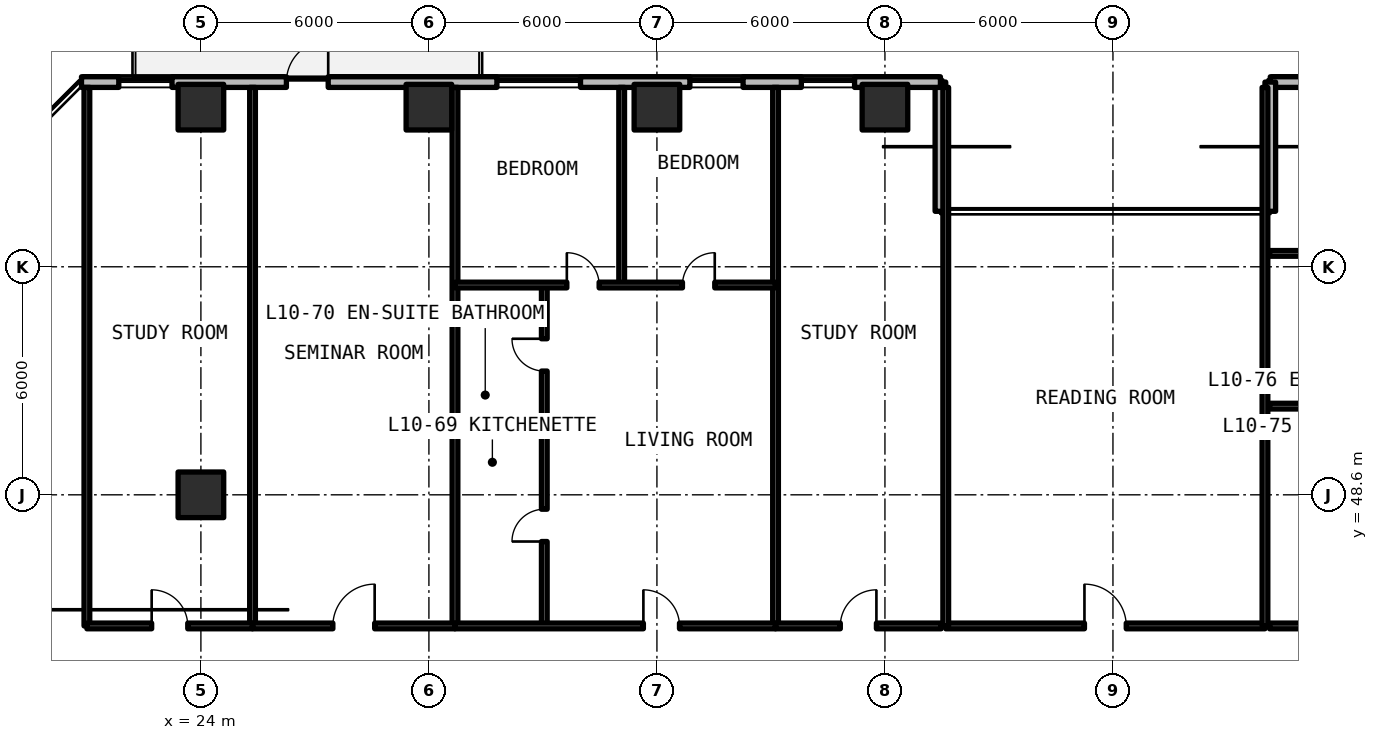
"""IFC4 building model, lengths in metres.
Left out: names, types, materials, properties, quantities, classifications, styles, units other than length and angle.
Written with IfcOpenShell. Run it as: python <this file> out.ifc"""

import sys

from ifc_helpers import new_model, si_unit, direction, frame, frame_2d, origin, origin_2d, place, context, subcontext, project, spatial, rectangle, extrude, element, fill, save


model = new_model("IFC4")
c1 = context("Model", 3, precision=1e-05, world=origin(), true_north=direction((0.0, 1.0)))
c2 = subcontext(c1, "Body", "Model", "MODEL_VIEW")
j1 = project(units=[si_unit("LENGTHUNIT", "METRE"), si_unit("PLANEANGLEUNIT", "RADIAN")], contexts=[c1])
p1 = place(None, origin())
s1 = spatial("IfcSite", under=j1, at=p1, CompositionType="ELEMENT")
p2 = place(p1, origin())
s2 = spatial("IfcBuilding", under=s1, at=p2, CompositionType="ELEMENT")
p3 = place(p2, frame((0.0, 0.0, 38.94)))
s3 = spatial("IfcBuildingStorey", under=s2, at=p3, CompositionType="ELEMENT", Elevation=38.94)
for number, where, z_axis, x_axis in (
    (1, (24.0, 48.6, 0.0), (0.0, 0.0, 1.0), (1.0, 0.0, 0.0)),
    (2, (24.0, 58.8, 0.0), (0.0, 0.0, 1.0), (1.0, 0.0, 0.0)),
    (3, (30.0, 58.8, 0.0), (0.0, 0.0, 1.0), (1.0, 0.0, 0.0)),
    (4, (36.0, 58.8, 0.0), (0.0, 0.0, 1.0), (1.0, 0.0, 0.0)),
    (5, (42.0, 58.8, 0.0), (0.0, 0.0, 1.0), (1.0, 0.0, 0.0)),
):
    element("IfcColumn", number, at=place(p3, frame(where, z_axis=z_axis, x_axis=x_axis)), inside=s3, PredefinedType="COLUMN", context=c2, shape_type="SweptSolid", body=[
        extrude(rectangle(XDim=1.2, YDim=1.2, at=origin_2d()), origin(), (0.0, 0.0, 1.0), 3.3),
    ])
p4 = place(p3, frame((96.542, 59.46, 0.0), z_axis=(0.0, 0.0, 1.0), x_axis=(-1.0, 0.0, 0.0)))
e6 = element("IfcWall", 6, at=p4, inside=s3, PredefinedType="SOLIDWALL", context=c2, shape_type="SweptSolid", body=[
    extrude(rectangle(XDim=44.402, YDim=0.28, at=frame_2d((22.201, 0.0))), origin(), (0.0, 0.0, 1.0), 3.08),
])
p5 = place(p4, frame((33.642, 0.0, 0.0)))
e7 = element("IfcOpeningElement", 7, at=p5, cuts=e6, PredefinedType="OPENING", context=c2, shape_type="SweptSolid", body=[
    extrude(rectangle(XDim=1.1, YDim=2.15, at=frame_2d((0.55, 1.075))), frame((0.0, 0.15, 0.0), z_axis=(0.0, -1.0, 0.0), x_axis=(1.0, 0.0, 0.0)), (0.0, 0.0, 1.0), 0.3),
])
p6 = place(p4, frame((21.292, 0.0, 0.0)))
e8 = element("IfcOpeningElement", 8, at=p6, cuts=e6, PredefinedType="OPENING", context=c2, shape_type="SweptSolid", body=[
    extrude(rectangle(XDim=1.1, YDim=2.15, at=frame_2d((0.55, 1.075))), frame((0.0, 0.15, 0.0), z_axis=(0.0, -1.0, 0.0), x_axis=(1.0, 0.0, 0.0)), (0.0, 0.0, 1.0), 0.3),
])
p7 = place(p4, frame((9.692, 0.0, 0.0)))
e9 = element("IfcOpeningElement", 9, at=p7, cuts=e6, PredefinedType="OPENING", context=c2, shape_type="SweptSolid", body=[
    extrude(rectangle(XDim=1.1, YDim=2.15, at=frame_2d((0.55, 1.075))), frame((0.0, 0.15, 0.0), z_axis=(0.0, -1.0, 0.0), x_axis=(1.0, 0.0, 0.0)), (0.0, 0.0, 1.0), 0.3),
])
p8 = place(p4, frame((39.455, 0.0, 0.78)))
e10 = element("IfcOpeningElement", 10, at=p8, cuts=e6, PredefinedType="OPENING", context=c2, shape_type="SweptSolid", body=[
    extrude(rectangle(XDim=2.2, YDim=1.66, at=frame_2d((1.1, 0.83))), frame((0.0, 0.15, 0.0), z_axis=(0.0, -1.0, 0.0), x_axis=(1.0, 0.0, 0.0)), (0.0, 0.0, 1.0), 0.3),
])
p9 = place(p4, frame((26.053, 0.0, 0.78)))
e11 = element("IfcOpeningElement", 11, at=p9, cuts=e6, PredefinedType="OPENING", context=c2, shape_type="SweptSolid", body=[
    extrude(rectangle(XDim=2.2, YDim=1.66, at=frame_2d((1.1, 0.83))), frame((0.0, 0.15, 0.0), z_axis=(0.0, -1.0, 0.0), x_axis=(1.0, 0.0, 0.0)), (0.0, 0.0, 1.0), 0.3),
])
p10 = place(p4, frame((2.098, 0.0, 0.78)))
e12 = element("IfcOpeningElement", 12, at=p10, cuts=e6, PredefinedType="OPENING", context=c2, shape_type="SweptSolid", body=[
    extrude(rectangle(XDim=2.2, YDim=1.66, at=frame_2d((1.1, 0.83))), frame((0.0, 0.15, 0.0), z_axis=(0.0, -1.0, 0.0), x_axis=(1.0, 0.0, 0.0)), (0.0, 0.0, 1.0), 0.3),
])
for number, where, z_axis, x_axis in (
    (13, (52.14, 59.46, 0.0), (0.0, 0.0, 1.0), (0.0, -1.0, 0.0)),
    (14, (43.46, 56.06, 0.0), (0.0, 0.0, 1.0), (0.0, 1.0, 0.0)),
):
    element("IfcWall", number, at=place(p3, frame(where, z_axis=z_axis, x_axis=x_axis)), inside=s3, PredefinedType="SOLIDWALL", context=c2, shape_type="SweptSolid", body=[
        extrude(rectangle(XDim=3.4, YDim=0.28, at=frame_2d((1.7, 0.0))), origin(), (0.0, 0.0, 1.0), 3.08),
    ])
p11 = place(p3, frame((43.46, 59.46, 0.0), z_axis=(0.0, 0.0, 1.0), x_axis=(-1.0, 0.0, 0.0)))
e15 = element("IfcWall", 15, at=p11, inside=s3, PredefinedType="SOLIDWALL", context=c2, shape_type="SweptSolid", body=[
    extrude(rectangle(XDim=22.602, YDim=0.28, at=frame_2d((11.301, 0.0))), origin(), (0.0, 0.0, 1.0), 3.08),
])
p12 = place(p11, frame((16.11, 0.0, 0.0)))
e16 = element("IfcOpeningElement", 16, at=p12, cuts=e15, PredefinedType="OPENING", context=c2, shape_type="SweptSolid", body=[
    extrude(rectangle(XDim=1.1, YDim=2.15, at=frame_2d((0.55, 1.075))), frame((0.0, 0.15, 0.0), z_axis=(0.0, -1.0, 0.0), x_axis=(1.0, 0.0, 0.0)), (0.0, 0.0, 1.0), 0.3),
])
p13 = place(p11, frame((20.221, 0.0, 0.78)))
e17 = element("IfcOpeningElement", 17, at=p13, cuts=e15, PredefinedType="OPENING", context=c2, shape_type="SweptSolid", body=[
    extrude(rectangle(XDim=1.4, YDim=1.65, at=frame_2d((0.7, 0.825))), frame((0.0, 0.15, 0.0), z_axis=(0.0, -1.0, 0.0), x_axis=(1.0, 0.0, 0.0)), (0.0, 0.0, 1.0), 0.3),
])
p14 = place(p11, frame((9.471, 0.0, 0.78)))
e18 = element("IfcOpeningElement", 18, at=p14, cuts=e15, PredefinedType="OPENING", context=c2, shape_type="SweptSolid", body=[
    extrude(rectangle(XDim=2.2, YDim=1.66, at=frame_2d((1.1, 0.83))), frame((0.0, 0.15, 0.0), z_axis=(0.0, -1.0, 0.0), x_axis=(1.0, 0.0, 0.0)), (0.0, 0.0, 1.0), 0.3),
])
p15 = place(p11, frame((5.193, 0.0, 0.78)))
e19 = element("IfcOpeningElement", 19, at=p15, cuts=e15, PredefinedType="OPENING", context=c2, shape_type="SweptSolid", body=[
    extrude(rectangle(XDim=1.4, YDim=1.65, at=frame_2d((0.7, 0.825))), frame((0.0, 0.15, 0.0), z_axis=(0.0, -1.0, 0.0), x_axis=(1.0, 0.0, 0.0)), (0.0, 0.0, 1.0), 0.3),
])
p16 = place(p11, frame((2.26, 0.0, 0.78)))
e20 = element("IfcOpeningElement", 20, at=p16, cuts=e15, PredefinedType="OPENING", context=c2, shape_type="SweptSolid", body=[
    extrude(rectangle(XDim=1.4, YDim=1.65, at=frame_2d((0.7, 0.825))), frame((0.0, 0.15, 0.0), z_axis=(0.0, -1.0, 0.0), x_axis=(1.0, 0.0, 0.0)), (0.0, 0.0, 1.0), 0.3),
])
p17 = place(p3, frame((43.6, 45.15, 0.0), z_axis=(0.0, 0.0, 1.0), x_axis=(1.0, 0.0, 0.0)))
e21 = element("IfcWall", 21, at=p17, inside=s3, PredefinedType="SOLIDWALL", context=c2, shape_type="SweptSolid", body=[
    extrude(rectangle(XDim=8.4, YDim=0.15, at=frame_2d((4.2, 0.0))), origin(), (0.0, 0.0, 1.0), 2.35),
])
p18 = place(p17, frame((3.65, 0.0, 0.0)))
e22 = element("IfcOpeningElement", 22, at=p18, cuts=e21, PredefinedType="OPENING", context=c2, shape_type="SweptSolid", body=[
    extrude(rectangle(XDim=1.1, YDim=2.15, at=frame_2d((0.55, 1.075))), frame((0.0, 0.085, 0.0), z_axis=(0.0, -1.0, 0.0), x_axis=(1.0, 0.0, 0.0)), (0.0, 0.0, 1.0), 0.17),
])
for number, where, z_axis, x_axis in (
    (23, (43.6, 45.15, 0.0), (0.0, 0.0, 1.0), (0.0, 1.0, 0.0)),
    (24, (52.0, 45.15, 0.0), (0.0, 0.0, 1.0), (0.0, 1.0, 0.0)),
    (25, (21.0, 45.15, 0.0), (0.0, 0.0, 1.0), (0.0, 1.0, 0.0)),
    (26, (25.359, 45.15, 0.0), (0.0, 0.0, 1.0), (0.0, 1.0, 0.0)),
):
    element("IfcWall", number, at=place(p3, frame(where, z_axis=z_axis, x_axis=x_axis)), inside=s3, PredefinedType="SOLIDWALL", context=c2, shape_type="SweptSolid", body=[
        extrude(rectangle(XDim=14.17, YDim=0.15, at=frame_2d((7.085, 0.0))), origin(), (0.0, 0.0, 1.0), 2.35),
    ])
p19 = place(p3, frame((21.0, 45.15, 0.0), z_axis=(0.0, 0.0, 1.0), x_axis=(1.0, 0.0, 0.0)))
e27 = element("IfcWall", 27, at=p19, inside=s3, PredefinedType="SOLIDWALL", context=c2, shape_type="SweptSolid", body=[
    extrude(rectangle(XDim=4.359, YDim=0.15, at=frame_2d((2.179, 0.0))), origin(), (0.0, 0.0, 1.0), 2.35),
])
p20 = place(p19, frame((1.704, 0.0, 0.0)))
e28 = element("IfcOpeningElement", 28, at=p20, cuts=e27, PredefinedType="OPENING", context=c2, shape_type="SweptSolid", body=[
    extrude(rectangle(XDim=0.95, YDim=2.15, at=frame_2d((0.475, 1.075))), frame((0.0, 0.085, 0.0), z_axis=(0.0, -1.0, 0.0), x_axis=(1.0, 0.0, 0.0)), (0.0, 0.0, 1.0), 0.17),
])
p21 = place(p3, frame((30.686, 45.15, 0.0), z_axis=(0.0, 0.0, 1.0), x_axis=(0.0, 1.0, 0.0)))
e29 = element("IfcWall", 29, at=p21, inside=s3, PredefinedType="SOLIDWALL", context=c2, shape_type="SweptSolid", body=[
    extrude(rectangle(XDim=14.17, YDim=0.15, at=frame_2d((7.085, 0.0))), origin(), (0.0, 0.0, 1.0), 2.35),
])
p22 = place(p3, frame((25.359, 45.15, 0.0), z_axis=(0.0, 0.0, 1.0), x_axis=(1.0, 0.0, 0.0)))
e30 = element("IfcWall", 30, at=p22, inside=s3, PredefinedType="SOLIDWALL", context=c2, shape_type="SweptSolid", body=[
    extrude(rectangle(XDim=5.327, YDim=0.15, at=frame_2d((2.664, 0.0))), origin(), (0.0, 0.0, 1.0), 2.35),
])
p23 = place(p22, frame((2.114, 0.0, 0.0)))
e31 = element("IfcOpeningElement", 31, at=p23, cuts=e30, PredefinedType="OPENING", context=c2, shape_type="SweptSolid", body=[
    extrude(rectangle(XDim=1.1, YDim=2.15, at=frame_2d((0.55, 1.075))), frame((0.0, 0.085, 0.0), z_axis=(0.0, -1.0, 0.0), x_axis=(1.0, 0.0, 0.0)), (0.0, 0.0, 1.0), 0.17),
])
p24 = place(p3, frame((39.121, 45.15, 0.0), z_axis=(0.0, 0.0, 1.0), x_axis=(0.0, 1.0, 0.0)))
e32 = element("IfcWall", 32, at=p24, inside=s3, PredefinedType="SOLIDWALL", context=c2, shape_type="SweptSolid", body=[
    extrude(rectangle(XDim=14.17, YDim=0.15, at=frame_2d((7.085, 0.0))), origin(), (0.0, 0.0, 1.0), 2.35),
])
p25 = place(p3, frame((30.686, 50.442, 0.0), z_axis=(0.0, 0.0, 1.0), x_axis=(1.0, 0.0, 0.0)))
e33 = element("IfcWall", 33, at=p25, inside=s3, PredefinedType="PARTITIONING", context=c2, shape_type="SweptSolid", body=[
    extrude(rectangle(XDim=2.35, YDim=0.15, at=frame_2d((1.175, 0.0))), origin(), (0.0, 0.0, 1.0), 2.35),
])
p26 = place(p3, frame((33.036, 45.15, 0.0), z_axis=(0.0, 0.0, 1.0), x_axis=(0.0, 1.0, 0.0)))
e34 = element("IfcWall", 34, at=p26, inside=s3, PredefinedType="PARTITIONING", context=c2, shape_type="SweptSolid", body=[
    extrude(rectangle(XDim=8.97, YDim=0.15, at=frame_2d((4.485, 0.0))), origin(), (0.0, 0.0, 1.0), 2.35),
])
p27 = place(p26, frame((2.221, 0.0, 0.0)))
e35 = element("IfcOpeningElement", 35, at=p27, cuts=e34, PredefinedType="OPENING", context=c2, shape_type="SweptSolid", body=[
    extrude(rectangle(XDim=0.85, YDim=2.1, at=frame_2d((0.425, 1.05))), frame((0.0, 0.085, 0.0), z_axis=(0.0, -1.0, 0.0), x_axis=(1.0, 0.0, 0.0)), (0.0, 0.0, 1.0), 0.17),
])
p28 = place(p26, frame((6.706, 0.0, 0.0)))
e36 = element("IfcOpeningElement", 36, at=p28, cuts=e34, PredefinedType="OPENING", context=c2, shape_type="SweptSolid", body=[
    extrude(rectangle(XDim=0.85, YDim=2.1, at=frame_2d((0.425, 1.05))), frame((0.0, 0.085, 0.0), z_axis=(0.0, -1.0, 0.0), x_axis=(1.0, 0.0, 0.0)), (0.0, 0.0, 1.0), 0.17),
])
p29 = place(p3, frame((35.073, 54.12, 0.0), z_axis=(0.0, 0.0, 1.0), x_axis=(0.0, 1.0, 0.0)))
e37 = element("IfcWall", 37, at=p29, inside=s3, PredefinedType="PARTITIONING", context=c2, shape_type="SweptSolid", body=[
    extrude(rectangle(XDim=5.2, YDim=0.15, at=frame_2d((2.6, 0.0))), origin(), (0.0, 0.0, 1.0), 2.35),
])
p30 = place(p3, frame((30.686, 54.12, 0.0), z_axis=(0.0, 0.0, 1.0), x_axis=(1.0, 0.0, 0.0)))
e38 = element("IfcWall", 38, at=p30, inside=s3, PredefinedType="PARTITIONING", context=c2, shape_type="SweptSolid", body=[
    extrude(rectangle(XDim=8.435, YDim=0.15, at=frame_2d((4.217, 0.0))), origin(), (0.0, 0.0, 1.0), 2.35),
])
p31 = place(p30, frame((2.943, 0.0, 0.0)))
e39 = element("IfcOpeningElement", 39, at=p31, cuts=e38, PredefinedType="OPENING", context=c2, shape_type="SweptSolid", body=[
    extrude(rectangle(XDim=0.85, YDim=2.1, at=frame_2d((0.425, 1.05))), frame((0.0, 0.085, 0.0), z_axis=(0.0, -1.0, 0.0), x_axis=(1.0, 0.0, 0.0)), (0.0, 0.0, 1.0), 0.17),
])
p32 = place(p30, frame((5.986, 0.0, 0.0)))
e40 = element("IfcOpeningElement", 40, at=p32, cuts=e38, PredefinedType="OPENING", context=c2, shape_type="SweptSolid", body=[
    extrude(rectangle(XDim=0.85, YDim=2.1, at=frame_2d((0.425, 1.05))), frame((0.0, 0.085, 0.0), z_axis=(0.0, -1.0, 0.0), x_axis=(1.0, 0.0, 0.0)), (0.0, 0.0, 1.0), 0.17),
])
p33 = place(p3, frame((30.686, 45.15, 0.0), z_axis=(0.0, 0.0, 1.0), x_axis=(1.0, 0.0, 0.0)))
e41 = element("IfcWall", 41, at=p33, inside=s3, PredefinedType="SOLIDWALL", context=c2, shape_type="SweptSolid", body=[
    extrude(rectangle(XDim=8.435, YDim=0.15, at=frame_2d((4.217, 0.0))), origin(), (0.0, 0.0, 1.0), 2.35),
])
p34 = place(p33, frame((4.958, 0.0, 0.0)))
e42 = element("IfcOpeningElement", 42, at=p34, cuts=e41, PredefinedType="OPENING", context=c2, shape_type="SweptSolid", body=[
    extrude(rectangle(XDim=0.95, YDim=2.15, at=frame_2d((0.475, 1.075))), frame((0.0, 0.085, 0.0), z_axis=(0.0, -1.0, 0.0), x_axis=(1.0, 0.0, 0.0)), (0.0, 0.0, 1.0), 0.17),
])
p35 = place(p3, frame((39.121, 45.15, 0.0), z_axis=(0.0, 0.0, 1.0), x_axis=(1.0, 0.0, 0.0)))
e43 = element("IfcWall", 43, at=p35, inside=s3, PredefinedType="SOLIDWALL", context=c2, shape_type="SweptSolid", body=[
    extrude(rectangle(XDim=4.359, YDim=0.15, at=frame_2d((2.179, 0.0))), origin(), (0.0, 0.0, 1.0), 2.35),
])
p36 = place(p35, frame((1.704, 0.0, 0.0)))
e44 = element("IfcOpeningElement", 44, at=p36, cuts=e43, PredefinedType="OPENING", context=c2, shape_type="SweptSolid", body=[
    extrude(rectangle(XDim=0.95, YDim=2.15, at=frame_2d((0.475, 1.075))), frame((0.0, 0.085, 0.0), z_axis=(0.0, -1.0, 0.0), x_axis=(1.0, 0.0, 0.0)), (0.0, 0.0, 1.0), 0.17),
])
p37 = place(p3, frame((52.12, 50.933, 0.0), z_axis=(0.0, 0.0, 1.0), x_axis=(1.0, 0.0, 0.0)))
e45 = element("IfcWall", 45, at=p37, inside=s3, PredefinedType="PARTITIONING", context=c2, shape_type="SweptSolid", body=[
    extrude(rectangle(XDim=3.8, YDim=0.15, at=frame_2d((1.9, 0.0))), origin(), (0.0, 0.0, 1.0), 2.35),
])
p38 = place(p3, frame((52.12, 54.952, 0.0), z_axis=(0.0, 0.0, 1.0), x_axis=(1.0, 0.0, 0.0)))
e46 = element("IfcWall", 46, at=p38, inside=s3, PredefinedType="PARTITIONING", context=c2, shape_type="SweptSolid", body=[
    extrude(rectangle(XDim=12.989, YDim=0.15, at=frame_2d((6.494, 0.0))), origin(), (0.0, 0.0, 1.0), 2.35),
])
p39 = place(p38, frame((4.852, 0.0, 0.0)))
e47 = element("IfcOpeningElement", 47, at=p39, cuts=e46, PredefinedType="OPENING", context=c2, shape_type="SweptSolid", body=[
    extrude(rectangle(XDim=0.85, YDim=2.1, at=frame_2d((0.425, 1.05))), frame((0.0, 0.085, 0.0), z_axis=(0.0, -1.0, 0.0), x_axis=(1.0, 0.0, 0.0)), (0.0, 0.0, 1.0), 0.17),
])
p40 = place(p38, frame((9.447, 0.0, 0.0)))
e48 = element("IfcOpeningElement", 48, at=p40, cuts=e46, PredefinedType="OPENING", context=c2, shape_type="SweptSolid", body=[
    extrude(rectangle(XDim=0.85, YDim=2.1, at=frame_2d((0.425, 1.05))), frame((0.0, 0.085, 0.0), z_axis=(0.0, -1.0, 0.0), x_axis=(1.0, 0.0, 0.0)), (0.0, 0.0, 1.0), 0.17),
])
p41 = place(p3, frame((52.12, 45.15, 0.0), z_axis=(0.0, 0.0, 1.0), x_axis=(1.0, 0.0, 0.0)))
e49 = element("IfcWall", 49, at=p41, inside=s3, PredefinedType="SOLIDWALL", context=c2, shape_type="SweptSolid", body=[
    extrude(rectangle(XDim=12.989, YDim=0.15, at=frame_2d((6.494, 0.0))), origin(), (0.0, 0.0, 1.0), 2.35),
])
p42 = place(p41, frame((5.387, 0.0, 0.0)))
e50 = element("IfcOpeningElement", 50, at=p42, cuts=e49, PredefinedType="OPENING", context=c2, shape_type="SweptSolid", body=[
    extrude(rectangle(XDim=0.95, YDim=2.15, at=frame_2d((0.475, 1.075))), frame((0.0, 0.085, 0.0), z_axis=(0.0, -1.0, 0.0), x_axis=(1.0, 0.0, 0.0)), (0.0, 0.0, 1.0), 0.17),
])
p43 = place(p12, frame((1.1, 0.0, 0.0), z_axis=(0.0, 0.0, 1.0), x_axis=(-1.0, 0.0, 0.0)))
e51 = element("IfcDoor", 51, at=p43, inside=s3, OperationType="SINGLE_SWING_RIGHT", PredefinedType="DOOR", context=c2, shape_type="SweptSolid", body=[
    extrude(rectangle(XDim=1.1, YDim=2.15, at=frame_2d((0.55, 1.075))), frame((0.0, 0.025, 0.0), z_axis=(0.0, -1.0, 0.0), x_axis=(1.0, 0.0, 0.0)), (0.0, 0.0, 1.0), 0.05),
])
fill(e16, e51)
p44 = place(p13, origin())
e52 = element("IfcWindow", 52, at=p44, inside=s3, PartitioningType="SINGLE_PANEL", PredefinedType="WINDOW", context=c2, shape_type="SweptSolid", body=[
    extrude(rectangle(XDim=1.4, YDim=1.65, at=frame_2d((0.7, 0.825))), frame((0.0, 0.03, 0.0), z_axis=(0.0, -1.0, 0.0), x_axis=(1.0, 0.0, 0.0)), (0.0, 0.0, 1.0), 0.06),
])
fill(e17, e52)
p45 = place(p14, origin())
e53 = element("IfcWindow", 53, at=p45, inside=s3, PartitioningType="SINGLE_PANEL", PredefinedType="WINDOW", context=c2, shape_type="SweptSolid", body=[
    extrude(rectangle(XDim=2.2, YDim=1.66, at=frame_2d((1.1, 0.83))), frame((0.0, 0.03, 0.0), z_axis=(0.0, -1.0, 0.0), x_axis=(1.0, 0.0, 0.0)), (0.0, 0.0, 1.0), 0.06),
])
fill(e18, e53)
p46 = place(p15, origin())
e54 = element("IfcWindow", 54, at=p46, inside=s3, PartitioningType="SINGLE_PANEL", PredefinedType="WINDOW", context=c2, shape_type="SweptSolid", body=[
    extrude(rectangle(XDim=1.4, YDim=1.65, at=frame_2d((0.7, 0.825))), frame((0.0, 0.03, 0.0), z_axis=(0.0, -1.0, 0.0), x_axis=(1.0, 0.0, 0.0)), (0.0, 0.0, 1.0), 0.06),
])
fill(e19, e54)
p47 = place(p16, origin())
e55 = element("IfcWindow", 55, at=p47, inside=s3, PartitioningType="SINGLE_PANEL", PredefinedType="WINDOW", context=c2, shape_type="SweptSolid", body=[
    extrude(rectangle(XDim=1.4, YDim=1.65, at=frame_2d((0.7, 0.825))), frame((0.0, 0.03, 0.0), z_axis=(0.0, -1.0, 0.0), x_axis=(1.0, 0.0, 0.0)), (0.0, 0.0, 1.0), 0.06),
])
fill(e20, e55)
p48 = place(p18, origin())
e56 = element("IfcDoor", 56, at=p48, inside=s3, OperationType="SINGLE_SWING_LEFT", PredefinedType="DOOR", context=c2, shape_type="SweptSolid", body=[
    extrude(rectangle(XDim=1.1, YDim=2.15, at=frame_2d((0.55, 1.075))), frame((0.0, 0.025, 0.0), z_axis=(0.0, -1.0, 0.0), x_axis=(1.0, 0.0, 0.0)), (0.0, 0.0, 1.0), 0.05),
])
fill(e22, e56)
p49 = place(p20, origin())
e57 = element("IfcDoor", 57, at=p49, inside=s3, OperationType="SINGLE_SWING_LEFT", PredefinedType="DOOR", context=c2, shape_type="SweptSolid", body=[
    extrude(rectangle(XDim=0.95, YDim=2.15, at=frame_2d((0.475, 1.075))), frame((0.0, 0.025, 0.0), z_axis=(0.0, -1.0, 0.0), x_axis=(1.0, 0.0, 0.0)), (0.0, 0.0, 1.0), 0.05),
])
fill(e28, e57)
p50 = place(p23, origin())
e58 = element("IfcDoor", 58, at=p50, inside=s3, OperationType="SINGLE_SWING_RIGHT", PredefinedType="DOOR", context=c2, shape_type="SweptSolid", body=[
    extrude(rectangle(XDim=1.1, YDim=2.15, at=frame_2d((0.55, 1.075))), frame((0.0, 0.025, 0.0), z_axis=(0.0, -1.0, 0.0), x_axis=(1.0, 0.0, 0.0)), (0.0, 0.0, 1.0), 0.05),
])
fill(e31, e58)
p51 = place(p27, origin())
e59 = element("IfcDoor", 59, at=p51, inside=s3, OperationType="SINGLE_SWING_LEFT", PredefinedType="DOOR", context=c2, shape_type="SweptSolid", body=[
    extrude(rectangle(XDim=0.85, YDim=2.1, at=frame_2d((0.425, 1.05))), frame((0.0, 0.025, 0.0), z_axis=(0.0, -1.0, 0.0), x_axis=(1.0, 0.0, 0.0)), (0.0, 0.0, 1.0), 0.05),
])
fill(e35, e59)
p52 = place(p28, origin())
e60 = element("IfcDoor", 60, at=p52, inside=s3, OperationType="SINGLE_SWING_RIGHT", PredefinedType="DOOR", context=c2, shape_type="SweptSolid", body=[
    extrude(rectangle(XDim=0.85, YDim=2.1, at=frame_2d((0.425, 1.05))), frame((0.0, 0.025, 0.0), z_axis=(0.0, -1.0, 0.0), x_axis=(1.0, 0.0, 0.0)), (0.0, 0.0, 1.0), 0.05),
])
fill(e36, e60)
p53 = place(p31, origin())
e61 = element("IfcDoor", 61, at=p53, inside=s3, OperationType="SINGLE_SWING_LEFT", PredefinedType="DOOR", context=c2, shape_type="SweptSolid", body=[
    extrude(rectangle(XDim=0.85, YDim=2.1, at=frame_2d((0.425, 1.05))), frame((0.0, 0.025, 0.0), z_axis=(0.0, -1.0, 0.0), x_axis=(1.0, 0.0, 0.0)), (0.0, 0.0, 1.0), 0.05),
])
fill(e39, e61)
p54 = place(p32, origin())
e62 = element("IfcDoor", 62, at=p54, inside=s3, OperationType="SINGLE_SWING_RIGHT", PredefinedType="DOOR", context=c2, shape_type="SweptSolid", body=[
    extrude(rectangle(XDim=0.85, YDim=2.1, at=frame_2d((0.425, 1.05))), frame((0.0, 0.025, 0.0), z_axis=(0.0, -1.0, 0.0), x_axis=(1.0, 0.0, 0.0)), (0.0, 0.0, 1.0), 0.05),
])
fill(e40, e62)
p55 = place(p34, origin())
e63 = element("IfcDoor", 63, at=p55, inside=s3, OperationType="SINGLE_SWING_LEFT", PredefinedType="DOOR", context=c2, shape_type="SweptSolid", body=[
    extrude(rectangle(XDim=0.95, YDim=2.15, at=frame_2d((0.475, 1.075))), frame((0.0, 0.025, 0.0), z_axis=(0.0, -1.0, 0.0), x_axis=(1.0, 0.0, 0.0)), (0.0, 0.0, 1.0), 0.05),
])
fill(e42, e63)
p56 = place(p36, origin())
e64 = element("IfcDoor", 64, at=p56, inside=s3, OperationType="SINGLE_SWING_RIGHT", PredefinedType="DOOR", context=c2, shape_type="SweptSolid", body=[
    extrude(rectangle(XDim=0.95, YDim=2.15, at=frame_2d((0.475, 1.075))), frame((0.0, 0.025, 0.0), z_axis=(0.0, -1.0, 0.0), x_axis=(1.0, 0.0, 0.0)), (0.0, 0.0, 1.0), 0.05),
])
fill(e44, e64)
save(model, sys.argv[1])
